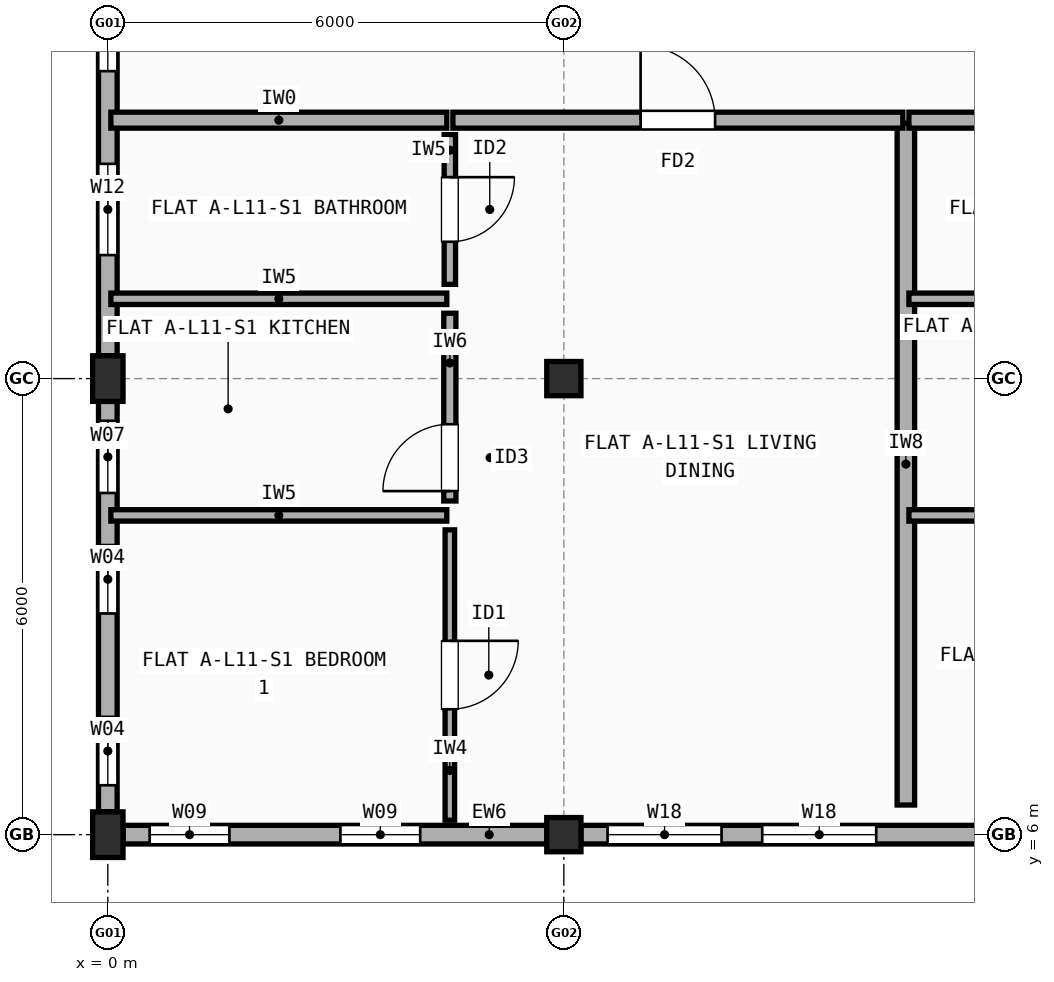
"""IFC4 building model, lengths in metres.
Left out: names, types, materials, properties, quantities, classifications, styles, units other than length and angle.
Written with IfcOpenShell. Run it as: python <this file> out.ifc"""

import sys

from ifc_helpers import new_model, si_unit, direction, frame, frame_2d, origin, origin_2d, place, context, subcontext, project, spatial, rectangle, extrude, element, fill, save


model = new_model("IFC4")
c1 = context("Model", 3, precision=1e-05, world=origin(), true_north=direction((0.0, 1.0)))
c2 = subcontext(c1, "Body", "Model", "MODEL_VIEW")
j1 = project(units=[si_unit("LENGTHUNIT", "METRE"), si_unit("PLANEANGLEUNIT", "RADIAN")], contexts=[c1])
p1 = place(None, origin())
s1 = spatial("IfcSite", under=j1, at=p1, CompositionType="ELEMENT")
p2 = place(p1, origin())
s2 = spatial("IfcBuilding", under=s1, at=p2, CompositionType="ELEMENT")
p3 = place(p2, frame((0.0, 0.0, 36.5)))
s3 = spatial("IfcBuildingStorey", under=s2, at=p3, CompositionType="ELEMENT", Elevation=36.5)
for number, where, z_axis, x_axis in (
    (1, (0.0, 6.0, 0.0), (0.0, 0.0, 1.0), (1.0, 0.0, 0.0)),
    (2, (0.0, 12.0, 0.0), (0.0, 0.0, 1.0), (1.0, 0.0, 0.0)),
):
    element("IfcColumn", number, at=place(p3, frame(where, z_axis=z_axis, x_axis=x_axis)), inside=s3, PredefinedType="COLUMN", context=c2, shape_type="SweptSolid", body=[
        extrude(rectangle(XDim=0.4, YDim=0.6, at=origin_2d()), origin(), (0.0, 0.0, 1.0), 2.995),
    ])
for number, where, z_axis, x_axis in (
    (3, (6.0, 6.0, 0.0), (0.0, 0.0, 1.0), (1.0, 0.0, 0.0)),
    (4, (6.0, 12.0, 0.0), (0.0, 0.0, 1.0), (1.0, 0.0, 0.0)),
):
    element("IfcColumn", number, at=place(p3, frame(where, z_axis=z_axis, x_axis=x_axis)), inside=s3, PredefinedType="COLUMN", context=c2, shape_type="SweptSolid", body=[
        extrude(rectangle(XDim=0.45, YDim=0.45, at=origin_2d()), origin(), (0.0, 0.0, 1.0), 2.995),
    ])
p4 = place(p3, frame((0.2, 6.0, 0.0), z_axis=(0.0, 0.0, 1.0), x_axis=(1.0, 0.0, 0.0)))
e5 = element("IfcWall", 5, at=p4, inside=s3, PredefinedType="STANDARD", context=c2, shape_type="SweptSolid", body=[
    extrude(rectangle(XDim=5.575, YDim=0.245, at=frame_2d((2.788, 0.0))), origin(), (0.0, 0.0, 1.0), 2.477),
])
p5 = place(p4, frame((0.35, 0.0, 0.9)))
e6 = element("IfcOpeningElement", 6, at=p5, cuts=e5, PredefinedType="OPENING", context=c2, shape_type="SweptSolid", body=[
    extrude(rectangle(XDim=1.05, YDim=1.35, at=frame_2d((0.525, 0.675))), frame((0.0, 0.133, 0.0), z_axis=(0.0, -1.0, 0.0), x_axis=(1.0, 0.0, 0.0)), (0.0, 0.0, 1.0), 0.265),
])
p6 = place(p4, frame((2.86, 0.0, 0.9)))
e7 = element("IfcOpeningElement", 7, at=p6, cuts=e5, PredefinedType="OPENING", context=c2, shape_type="SweptSolid", body=[
    extrude(rectangle(XDim=1.05, YDim=1.35, at=frame_2d((0.525, 0.675))), frame((0.0, 0.133, 0.0), z_axis=(0.0, -1.0, 0.0), x_axis=(1.0, 0.0, 0.0)), (0.0, 0.0, 1.0), 0.265),
])
p7 = place(p3, frame((6.225, 6.0, 0.0), z_axis=(0.0, 0.0, 1.0), x_axis=(1.0, 0.0, 0.0)))
e8 = element("IfcWall", 8, at=p7, inside=s3, PredefinedType="STANDARD", context=c2, shape_type="SweptSolid", body=[
    extrude(rectangle(XDim=5.55, YDim=0.245, at=frame_2d((2.775, 0.0))), origin(), (0.0, 0.0, 1.0), 2.477),
])
p8 = place(p7, frame((0.35, 0.0, 0.9)))
e9 = element("IfcOpeningElement", 9, at=p8, cuts=e8, PredefinedType="OPENING", context=c2, shape_type="SweptSolid", body=[
    extrude(rectangle(XDim=1.5, YDim=1.4, at=frame_2d((0.75, 0.7))), frame((0.0, 0.133, 0.0), z_axis=(0.0, -1.0, 0.0), x_axis=(1.0, 0.0, 0.0)), (0.0, 0.0, 1.0), 0.265),
])
p9 = place(p7, frame((2.385, 0.0, 0.9)))
e10 = element("IfcOpeningElement", 10, at=p9, cuts=e8, PredefinedType="OPENING", context=c2, shape_type="SweptSolid", body=[
    extrude(rectangle(XDim=1.5, YDim=1.4, at=frame_2d((0.75, 0.7))), frame((0.0, 0.133, 0.0), z_axis=(0.0, -1.0, 0.0), x_axis=(1.0, 0.0, 0.0)), (0.0, 0.0, 1.0), 0.265),
])
p10 = place(p3, frame((0.0, 17.7, 0.0), z_axis=(0.0, 0.0, 1.0), x_axis=(0.0, -1.0, 0.0)))
e11 = element("IfcWall", 11, at=p10, inside=s3, PredefinedType="STANDARD", context=c2, shape_type="SweptSolid", body=[
    extrude(rectangle(XDim=5.4, YDim=0.245, at=frame_2d((2.7, 0.0))), origin(), (0.0, 0.0, 1.0), 2.477),
])
p11 = place(p10, frame((0.605, 0.0, 0.9)))
e12 = element("IfcOpeningElement", 12, at=p11, cuts=e11, PredefinedType="OPENING", context=c2, shape_type="SweptSolid", body=[
    extrude(rectangle(XDim=1.05, YDim=1.35, at=frame_2d((0.525, 0.675))), frame((0.0, 0.133, 0.0), z_axis=(0.0, -1.0, 0.0), x_axis=(1.0, 0.0, 0.0)), (0.0, 0.0, 1.0), 0.265),
])
p12 = place(p10, frame((2.875, 0.0, 0.9)))
e13 = element("IfcOpeningElement", 13, at=p12, cuts=e11, PredefinedType="OPENING", context=c2, shape_type="SweptSolid", body=[
    extrude(rectangle(XDim=1.2, YDim=1.35, at=frame_2d((0.6, 0.675))), frame((0.0, 0.133, 0.0), z_axis=(0.0, -1.0, 0.0), x_axis=(1.0, 0.0, 0.0)), (0.0, 0.0, 1.0), 0.265),
])
p13 = place(p3, frame((0.0, 11.7, 0.0), z_axis=(0.0, 0.0, 1.0), x_axis=(0.0, -1.0, 0.0)))
e14 = element("IfcWall", 14, at=p13, inside=s3, PredefinedType="STANDARD", context=c2, shape_type="SweptSolid", body=[
    extrude(rectangle(XDim=5.4, YDim=0.245, at=frame_2d((2.7, 0.0))), origin(), (0.0, 0.0, 1.0), 2.477),
])
p14 = place(p13, frame((0.255, 0.0, 0.9)))
e15 = element("IfcOpeningElement", 15, at=p14, cuts=e14, PredefinedType="OPENING", context=c2, shape_type="SweptSolid", body=[
    extrude(rectangle(XDim=0.95, YDim=1.35, at=frame_2d((0.475, 0.675))), frame((0.0, 0.133, 0.0), z_axis=(0.0, -1.0, 0.0), x_axis=(1.0, 0.0, 0.0)), (0.0, 0.0, 1.0), 0.265),
])
p15 = place(p13, frame((1.89, 0.0, 0.9)))
e16 = element("IfcOpeningElement", 16, at=p15, cuts=e14, PredefinedType="OPENING", context=c2, shape_type="SweptSolid", body=[
    extrude(rectangle(XDim=0.9, YDim=1.3, at=frame_2d((0.45, 0.65))), frame((0.0, 0.133, 0.0), z_axis=(0.0, -1.0, 0.0), x_axis=(1.0, 0.0, 0.0)), (0.0, 0.0, 1.0), 0.265),
])
p16 = place(p13, frame((4.15, 0.0, 0.9)))
e17 = element("IfcOpeningElement", 17, at=p16, cuts=e14, PredefinedType="OPENING", context=c2, shape_type="SweptSolid", body=[
    extrude(rectangle(XDim=0.9, YDim=1.3, at=frame_2d((0.45, 0.65))), frame((0.0, 0.133, 0.0), z_axis=(0.0, -1.0, 0.0), x_axis=(1.0, 0.0, 0.0)), (0.0, 0.0, 1.0), 0.265),
])
p17 = place(p3, frame((10.5, 6.39, 0.0), z_axis=(0.0, 0.0, 1.0), x_axis=(0.0, 1.0, 0.0)))
e18 = element("IfcWall", 18, at=p17, inside=s3, PredefinedType="SOLIDWALL", context=c2, shape_type="SweptSolid", body=[
    extrude(rectangle(XDim=8.97, YDim=0.23, at=frame_2d((4.485, 0.0))), origin(), (0.0, 0.0, 1.0), 2.527),
])
p18 = place(p3, frame((0.04, 15.4, 0.0), z_axis=(0.0, 0.0, 1.0), x_axis=(1.0, 0.0, 0.0)))
e19 = element("IfcWall", 19, at=p18, inside=s3, PredefinedType="SOLIDWALL", context=c2, shape_type="SweptSolid", body=[
    extrude(rectangle(XDim=4.42, YDim=0.21, at=frame_2d((2.21, 0.0))), origin(), (0.0, 0.0, 1.0), 2.477),
])
p19 = place(p3, frame((4.54, 15.4, 0.0), z_axis=(0.0, 0.0, 1.0), x_axis=(1.0, 0.0, 0.0)))
e20 = element("IfcWall", 20, at=p19, inside=s3, PredefinedType="SOLIDWALL", context=c2, shape_type="SweptSolid", body=[
    extrude(rectangle(XDim=5.92, YDim=0.21, at=frame_2d((2.96, 0.0))), origin(), (0.0, 0.0, 1.0), 2.458),
])
p20 = place(p19, frame((2.47, 0.0, 0.0)))
e21 = element("IfcOpeningElement", 21, at=p20, cuts=e20, PredefinedType="OPENING", context=c2, shape_type="SweptSolid", body=[
    extrude(rectangle(XDim=0.98, YDim=2.15, at=frame_2d((0.49, 1.075))), frame((0.0, 0.115, 0.0), z_axis=(0.0, -1.0, 0.0), x_axis=(1.0, 0.0, 0.0)), (0.0, 0.0, 1.0), 0.23),
])
p21 = place(p3, frame((4.5, 6.19, 0.0), z_axis=(0.0, 0.0, 1.0), x_axis=(0.0, 1.0, 0.0)))
e22 = element("IfcWall", 22, at=p21, inside=s3, PredefinedType="PARTITIONING", context=c2, shape_type="SweptSolid", body=[
    extrude(rectangle(XDim=3.82, YDim=0.125, at=frame_2d((1.91, 0.0))), origin(), (0.0, 0.0, 1.0), 2.995),
])
p22 = place(p21, frame((1.46, 0.0, 0.0)))
e23 = element("IfcOpeningElement", 23, at=p22, cuts=e22, PredefinedType="OPENING", context=c2, shape_type="SweptSolid", body=[
    extrude(rectangle(XDim=0.9, YDim=2.1, at=frame_2d((0.45, 1.05))), frame((0.0, 0.073, 0.0), z_axis=(0.0, -1.0, 0.0), x_axis=(1.0, 0.0, 0.0)), (0.0, 0.0, 1.0), 0.145),
])
p23 = place(p3, frame((4.5, 10.39, 0.0), z_axis=(0.0, 0.0, 1.0), x_axis=(0.0, 1.0, 0.0)))
e24 = element("IfcWall", 24, at=p23, inside=s3, PredefinedType="PLUMBINGWALL", context=c2, shape_type="SweptSolid", body=[
    extrude(rectangle(XDim=2.47, YDim=0.16, at=frame_2d((1.235, 0.0))), origin(), (0.0, 0.0, 1.0), 2.527),
])
p24 = place(p23, frame((0.13, 0.0, 0.0)))
e25 = element("IfcOpeningElement", 25, at=p24, cuts=e24, PredefinedType="OPENING", context=c2, shape_type="SweptSolid", body=[
    extrude(rectangle(XDim=0.88, YDim=2.1, at=frame_2d((0.44, 1.05))), frame((0.0, 0.09, 0.0), z_axis=(0.0, -1.0, 0.0), x_axis=(1.0, 0.0, 0.0)), (0.0, 0.0, 1.0), 0.18),
])
p25 = place(p3, frame((4.5, 13.24, 0.0), z_axis=(0.0, 0.0, 1.0), x_axis=(0.0, 1.0, 0.0)))
e26 = element("IfcWall", 26, at=p25, inside=s3, PredefinedType="PARTITIONING", context=c2, shape_type="SweptSolid", body=[
    extrude(rectangle(XDim=1.97, YDim=0.15, at=frame_2d((0.985, 0.0))), origin(), (0.0, 0.0, 1.0), 2.995),
])
p26 = place(p25, frame((0.56, 0.0, 0.0)))
e27 = element("IfcOpeningElement", 27, at=p26, cuts=e26, PredefinedType="OPENING", context=c2, shape_type="SweptSolid", body=[
    extrude(rectangle(XDim=0.85, YDim=2.1, at=frame_2d((0.425, 1.05))), frame((0.0, 0.085, 0.0), z_axis=(0.0, -1.0, 0.0), x_axis=(1.0, 0.0, 0.0)), (0.0, 0.0, 1.0), 0.17),
])
for number, where, z_axis, x_axis in (
    (28, (0.04, 10.2, 0.0), (0.0, 0.0, 1.0), (1.0, 0.0, 0.0)),
    (29, (0.04, 13.05, 0.0), (0.0, 0.0, 1.0), (1.0, 0.0, 0.0)),
):
    element("IfcWall", number, at=place(p3, frame(where, z_axis=z_axis, x_axis=x_axis)), inside=s3, PredefinedType="PARTITIONING", context=c2, shape_type="SweptSolid", body=[
        extrude(rectangle(XDim=4.42, YDim=0.15, at=frame_2d((2.21, 0.0))), origin(), (0.0, 0.0, 1.0), 2.477),
    ])
p27 = place(p3, frame((10.54, 15.4, 0.0), z_axis=(0.0, 0.0, 1.0), x_axis=(1.0, 0.0, 0.0)))
e30 = element("IfcWall", 30, at=p27, inside=s3, PredefinedType="SOLIDWALL", context=c2, shape_type="SweptSolid", body=[
    extrude(rectangle(XDim=4.42, YDim=0.21, at=frame_2d((2.21, 0.0))), origin(), (0.0, 0.0, 1.0), 2.458),
])
p28 = place(p3, frame((10.54, 10.2, 0.0), z_axis=(0.0, 0.0, 1.0), x_axis=(1.0, 0.0, 0.0)))
e31 = element("IfcWall", 31, at=p28, inside=s3, PredefinedType="PARTITIONING", context=c2, shape_type="SweptSolid", body=[
    extrude(rectangle(XDim=4.42, YDim=0.15, at=frame_2d((2.21, 0.0))), origin(), (0.0, 0.0, 1.0), 2.508),
])
p29 = place(p3, frame((10.54, 13.05, 0.0), z_axis=(0.0, 0.0, 1.0), x_axis=(1.0, 0.0, 0.0)))
e32 = element("IfcWall", 32, at=p29, inside=s3, PredefinedType="PARTITIONING", context=c2, shape_type="SweptSolid", body=[
    extrude(rectangle(XDim=4.42, YDim=0.15, at=frame_2d((2.21, 0.0))), origin(), (0.0, 0.0, 1.0), 2.458),
])
p30 = place(p5, origin())
e33 = element("IfcWindow", 33, at=p30, inside=s3, PartitioningType="SINGLE_PANEL", PredefinedType="WINDOW", context=c2, shape_type="SweptSolid", body=[
    extrude(rectangle(XDim=1.05, YDim=1.35, at=frame_2d((0.525, 0.675))), frame((0.0, 0.03, 0.0), z_axis=(0.0, -1.0, 0.0), x_axis=(1.0, 0.0, 0.0)), (0.0, 0.0, 1.0), 0.06),
])
fill(e6, e33)
p31 = place(p6, origin())
e34 = element("IfcWindow", 34, at=p31, inside=s3, PartitioningType="SINGLE_PANEL", PredefinedType="WINDOW", context=c2, shape_type="SweptSolid", body=[
    extrude(rectangle(XDim=1.05, YDim=1.35, at=frame_2d((0.525, 0.675))), frame((0.0, 0.03, 0.0), z_axis=(0.0, -1.0, 0.0), x_axis=(1.0, 0.0, 0.0)), (0.0, 0.0, 1.0), 0.06),
])
fill(e7, e34)
p32 = place(p8, origin())
e35 = element("IfcWindow", 35, at=p32, inside=s3, PartitioningType="SINGLE_PANEL", PredefinedType="WINDOW", context=c2, shape_type="SweptSolid", body=[
    extrude(rectangle(XDim=1.5, YDim=1.4, at=frame_2d((0.75, 0.7))), frame((0.0, 0.03, 0.0), z_axis=(0.0, -1.0, 0.0), x_axis=(1.0, 0.0, 0.0)), (0.0, 0.0, 1.0), 0.06),
])
fill(e9, e35)
p33 = place(p9, origin())
e36 = element("IfcWindow", 36, at=p33, inside=s3, PartitioningType="SINGLE_PANEL", PredefinedType="WINDOW", context=c2, shape_type="SweptSolid", body=[
    extrude(rectangle(XDim=1.5, YDim=1.4, at=frame_2d((0.75, 0.7))), frame((0.0, 0.03, 0.0), z_axis=(0.0, -1.0, 0.0), x_axis=(1.0, 0.0, 0.0)), (0.0, 0.0, 1.0), 0.06),
])
fill(e10, e36)
p34 = place(p11, origin())
e37 = element("IfcWindow", 37, at=p34, inside=s3, PartitioningType="SINGLE_PANEL", PredefinedType="WINDOW", context=c2, shape_type="SweptSolid", body=[
    extrude(rectangle(XDim=1.05, YDim=1.35, at=frame_2d((0.525, 0.675))), frame((0.0, 0.03, 0.0), z_axis=(0.0, -1.0, 0.0), x_axis=(1.0, 0.0, 0.0)), (0.0, 0.0, 1.0), 0.06),
])
fill(e12, e37)
p35 = place(p12, origin())
e38 = element("IfcWindow", 38, at=p35, inside=s3, PartitioningType="SINGLE_PANEL", PredefinedType="WINDOW", context=c2, shape_type="SweptSolid", body=[
    extrude(rectangle(XDim=1.2, YDim=1.35, at=frame_2d((0.6, 0.675))), frame((0.0, 0.03, 0.0), z_axis=(0.0, -1.0, 0.0), x_axis=(1.0, 0.0, 0.0)), (0.0, 0.0, 1.0), 0.06),
])
fill(e13, e38)
p36 = place(p14, origin())
e39 = element("IfcWindow", 39, at=p36, inside=s3, PartitioningType="SINGLE_PANEL", PredefinedType="WINDOW", context=c2, shape_type="SweptSolid", body=[
    extrude(rectangle(XDim=0.95, YDim=1.35, at=frame_2d((0.475, 0.675))), frame((0.0, 0.03, 0.0), z_axis=(0.0, -1.0, 0.0), x_axis=(1.0, 0.0, 0.0)), (0.0, 0.0, 1.0), 0.06),
])
fill(e15, e39)
p37 = place(p15, origin())
e40 = element("IfcWindow", 40, at=p37, inside=s3, PartitioningType="SINGLE_PANEL", PredefinedType="WINDOW", context=c2, shape_type="SweptSolid", body=[
    extrude(rectangle(XDim=0.9, YDim=1.3, at=frame_2d((0.45, 0.65))), frame((0.0, 0.03, 0.0), z_axis=(0.0, -1.0, 0.0), x_axis=(1.0, 0.0, 0.0)), (0.0, 0.0, 1.0), 0.06),
])
fill(e16, e40)
p38 = place(p16, origin())
e41 = element("IfcWindow", 41, at=p38, inside=s3, PartitioningType="SINGLE_PANEL", PredefinedType="WINDOW", context=c2, shape_type="SweptSolid", body=[
    extrude(rectangle(XDim=0.9, YDim=1.3, at=frame_2d((0.45, 0.65))), frame((0.0, 0.03, 0.0), z_axis=(0.0, -1.0, 0.0), x_axis=(1.0, 0.0, 0.0)), (0.0, 0.0, 1.0), 0.06),
])
fill(e17, e41)
p39 = place(p20, origin())
e42 = element("IfcDoor", 42, at=p39, inside=s3, OperationType="SINGLE_SWING_LEFT", PredefinedType="DOOR", context=c2, shape_type="SweptSolid", body=[
    extrude(rectangle(XDim=0.98, YDim=2.15, at=frame_2d((0.49, 1.075))), frame((0.0, 0.025, 0.0), z_axis=(0.0, -1.0, 0.0), x_axis=(1.0, 0.0, 0.0)), (0.0, 0.0, 1.0), 0.05),
])
fill(e21, e42)
p40 = place(p22, origin())
e43 = element("IfcDoor", 43, at=p40, inside=s3, OperationType="SINGLE_SWING_RIGHT", PredefinedType="DOOR", context=c2, shape_type="SweptSolid", body=[
    extrude(rectangle(XDim=0.9, YDim=2.1, at=frame_2d((0.45, 1.05))), frame((0.0, 0.025, 0.0), z_axis=(0.0, -1.0, 0.0), x_axis=(1.0, 0.0, 0.0)), (0.0, 0.0, 1.0), 0.05),
])
fill(e23, e43)
p41 = place(p24, origin())
e44 = element("IfcDoor", 44, at=p41, inside=s3, OperationType="SINGLE_SWING_LEFT", PredefinedType="DOOR", context=c2, shape_type="SweptSolid", body=[
    extrude(rectangle(XDim=0.88, YDim=2.1, at=frame_2d((0.44, 1.05))), frame((0.0, 0.025, 0.0), z_axis=(0.0, -1.0, 0.0), x_axis=(1.0, 0.0, 0.0)), (0.0, 0.0, 1.0), 0.05),
])
fill(e25, e44)
p42 = place(p26, origin())
e45 = element("IfcDoor", 45, at=p42, inside=s3, OperationType="SINGLE_SWING_RIGHT", PredefinedType="DOOR", context=c2, shape_type="SweptSolid", body=[
    extrude(rectangle(XDim=0.85, YDim=2.1, at=frame_2d((0.425, 1.05))), frame((0.0, 0.025, 0.0), z_axis=(0.0, -1.0, 0.0), x_axis=(1.0, 0.0, 0.0)), (0.0, 0.0, 1.0), 0.05),
])
fill(e27, e45)
save(model, sys.argv[1])
